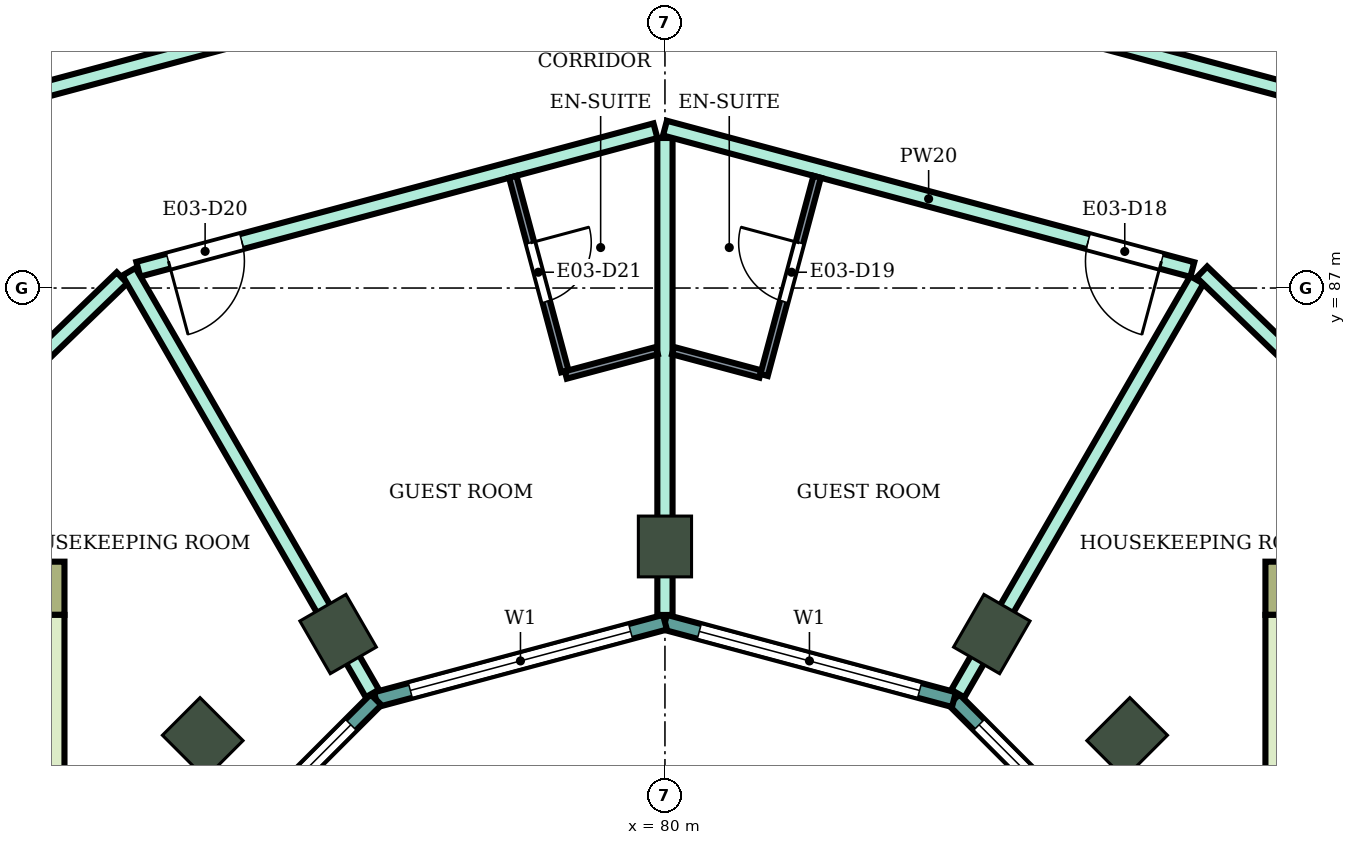
"""IFC4 building model, lengths in metres.
Left out: names, types, materials, properties, quantities, classifications, styles, units other than length and angle.
Written with IfcOpenShell. Run it as: python <this file> out.ifc"""

import sys

from ifc_helpers import new_model, si_unit, direction, frame, frame_2d, origin, origin_2d, place, context, subcontext, project, spatial, rectangle, extrude, element, fill, save


model = new_model("IFC4")
c1 = context("Model", 3, precision=1e-05, world=origin(), true_north=direction((0.0, 1.0)))
c2 = subcontext(c1, "Body", "Model", "MODEL_VIEW")
j1 = project(units=[si_unit("LENGTHUNIT", "METRE"), si_unit("PLANEANGLEUNIT", "RADIAN")], contexts=[c1])
p1 = place(None, origin())
s1 = spatial("IfcSite", under=j1, at=p1, CompositionType="ELEMENT")
p2 = place(p1, origin())
s2 = spatial("IfcBuilding", under=s1, at=p2, CompositionType="ELEMENT")
p3 = place(p2, frame((0.0, 0.0, 138.0)))
s3 = spatial("IfcBuildingStorey", under=s2, at=p3, CompositionType="ELEMENT", Elevation=138.0)
for number, where, z_axis, x_axis in (
    (1, (86.081, 81.081, 0.0), (0.0, 0.0, 1.0), (0.707, 0.707, 0.0)),
    (2, (84.3, 82.448, 0.0), (0.0, 0.0, 1.0), (0.5, 0.866, 0.0)),
    (3, (80.0, 83.6, 0.0), (0.0, 0.0, 1.0), (0.0, 1.0, 0.0)),
    (4, (75.7, 82.448, 0.0), (0.0, 0.0, 1.0), (-0.5, 0.866, 0.0)),
    (5, (73.919, 81.081, 0.0), (0.0, 0.0, 1.0), (-0.707, 0.707, 0.0)),
):
    element("IfcColumn", number, at=place(p3, frame(where, z_axis=z_axis, x_axis=x_axis)), inside=s3, PredefinedType="COLUMN", context=c2, shape_type="SweptSolid", body=[
        extrude(rectangle(XDim=0.8, YDim=0.7, at=origin_2d()), origin(), (0.0, 0.0, 1.0), 3.9),
    ])
p4 = place(p3, frame((87.9, 83.05, 0.0), z_axis=(0.0, 0.0, 1.0), x_axis=(1.0, 0.0, 0.0)))
e6 = element("IfcWall", 6, at=p4, inside=s3, PredefinedType="SHEAR", context=c2, shape_type="SweptSolid", body=[
    extrude(rectangle(XDim=14.8, YDim=0.7, at=frame_2d((7.4, 0.0))), origin(), (0.0, 0.0, 1.0), 3.58),
])
p5 = place(p4, frame((4.2, 0.0, 0.0)))
e7 = element("IfcOpeningElement", 7, at=p5, cuts=e6, PredefinedType="OPENING", context=c2, shape_type="SweptSolid", body=[
    extrude(rectangle(XDim=2.4, YDim=2.4, at=frame_2d((1.2, 1.2))), frame((0.0, 0.36, 0.0), z_axis=(0.0, -1.0, 0.0), x_axis=(1.0, 0.0, 0.0)), (0.0, 0.0, 1.0), 0.72),
])
p6 = place(p3, frame((88.125, 75.0, 0.0), z_axis=(0.0, 0.0, 1.0), x_axis=(0.0, 1.0, 0.0)))
e8 = element("IfcWall", 8, at=p6, inside=s3, PredefinedType="SHEAR", context=c2, shape_type="SweptSolid", body=[
    extrude(rectangle(XDim=7.7, YDim=0.45, at=frame_2d((3.85, 0.0))), origin(), (0.0, 0.0, 1.0), 3.58),
])
p7 = place(p3, frame((72.1, 83.05, 0.0), z_axis=(0.0, 0.0, 1.0), x_axis=(-1.0, 0.0, 0.0)))
e9 = element("IfcWall", 9, at=p7, inside=s3, PredefinedType="SHEAR", context=c2, shape_type="SweptSolid", body=[
    extrude(rectangle(XDim=14.8, YDim=0.7, at=frame_2d((7.4, 0.0))), origin(), (0.0, 0.0, 1.0), 3.58),
])
p8 = place(p7, frame((4.2, 0.0, 0.0)))
e10 = element("IfcOpeningElement", 10, at=p8, cuts=e9, PredefinedType="OPENING", context=c2, shape_type="SweptSolid", body=[
    extrude(rectangle(XDim=2.4, YDim=2.4, at=frame_2d((1.2, 1.2))), frame((0.0, 0.36, 0.0), z_axis=(0.0, -1.0, 0.0), x_axis=(1.0, 0.0, 0.0)), (0.0, 0.0, 1.0), 0.72),
])
p9 = place(p3, frame((71.875, 82.7, 0.0), z_axis=(0.0, 0.0, 1.0), x_axis=(0.0, -1.0, 0.0)))
e11 = element("IfcWall", 11, at=p9, inside=s3, PredefinedType="SHEAR", context=c2, shape_type="SweptSolid", body=[
    extrude(rectangle(XDim=7.7, YDim=0.45, at=frame_2d((3.85, 0.0))), origin(), (0.0, 0.0, 1.0), 3.58),
])
p10 = place(p3, frame((86.585, 78.802, 0.0), z_axis=(0.0, 0.0, 1.0), x_axis=(-0.707106781187, 0.707106781187, 0.0)))
e12 = element("IfcWall", 12, at=p10, inside=s3, PredefinedType="NOTDEFINED", context=c2, shape_type="SweptSolid", body=[
    extrude(rectangle(XDim=3.936, YDim=0.2, at=frame_2d((1.968, 0.0))), origin(), (0.0, 0.0, 1.0), 3.9),
])
p11 = place(p10, frame((0.468, 0.0, 0.9)))
e13 = element("IfcOpeningElement", 13, at=p11, cuts=e12, PredefinedType="OPENING", context=c2, shape_type="SweptSolid", body=[
    extrude(rectangle(XDim=3.0, YDim=2.3, at=frame_2d((1.5, 1.15))), frame((0.0, 0.11, 0.0), z_axis=(0.0, -1.0, 0.0), x_axis=(1.0, 0.0, 0.0)), (0.0, 0.0, 1.0), 0.22),
])
p12 = place(p3, frame((83.802, 81.585, 0.0), z_axis=(0.0, 0.0, 1.0), x_axis=(-0.965933654434, 0.258789828301, 0.0)))
e14 = element("IfcWall", 14, at=p12, inside=s3, PredefinedType="NOTDEFINED", context=c2, shape_type="SweptSolid", body=[
    extrude(rectangle(XDim=3.936, YDim=0.2, at=frame_2d((1.968, 0.0))), origin(), (0.0, 0.0, 1.0), 3.9),
])
p13 = place(p12, frame((0.468, 0.0, 0.9)))
e15 = element("IfcOpeningElement", 15, at=p13, cuts=e14, PredefinedType="OPENING", context=c2, shape_type="SweptSolid", body=[
    extrude(rectangle(XDim=3.0, YDim=2.3, at=frame_2d((1.5, 1.15))), frame((0.0, 0.11, 0.0), z_axis=(0.0, -1.0, 0.0), x_axis=(1.0, 0.0, 0.0)), (0.0, 0.0, 1.0), 0.22),
])
p14 = place(p3, frame((80.0, 82.604, 0.0), z_axis=(0.0, 0.0, 1.0), x_axis=(-0.965933654434, -0.258789828301, 0.0)))
e16 = element("IfcWall", 16, at=p14, inside=s3, PredefinedType="NOTDEFINED", context=c2, shape_type="SweptSolid", body=[
    extrude(rectangle(XDim=3.936, YDim=0.2, at=frame_2d((1.968, 0.0))), origin(), (0.0, 0.0, 1.0), 3.9),
])
p15 = place(p14, frame((0.468, 0.0, 0.9)))
e17 = element("IfcOpeningElement", 17, at=p15, cuts=e16, PredefinedType="OPENING", context=c2, shape_type="SweptSolid", body=[
    extrude(rectangle(XDim=3.0, YDim=2.3, at=frame_2d((1.5, 1.15))), frame((0.0, 0.11, 0.0), z_axis=(0.0, -1.0, 0.0), x_axis=(1.0, 0.0, 0.0)), (0.0, 0.0, 1.0), 0.22),
])
p16 = place(p3, frame((76.198, 81.585, 0.0), z_axis=(0.0, 0.0, 1.0), x_axis=(-0.707106781187, -0.707106781187, 0.0)))
e18 = element("IfcWall", 18, at=p16, inside=s3, PredefinedType="NOTDEFINED", context=c2, shape_type="SweptSolid", body=[
    extrude(rectangle(XDim=3.936, YDim=0.2, at=frame_2d((1.968, 0.0))), origin(), (0.0, 0.0, 1.0), 3.9),
])
p17 = place(p16, frame((0.468, 0.0, 0.9)))
e19 = element("IfcOpeningElement", 19, at=p17, cuts=e18, PredefinedType="OPENING", context=c2, shape_type="SweptSolid", body=[
    extrude(rectangle(XDim=3.0, YDim=2.3, at=frame_2d((1.5, 1.15))), frame((0.0, 0.11, 0.0), z_axis=(0.0, -1.0, 0.0), x_axis=(1.0, 0.0, 0.0)), (0.0, 0.0, 1.0), 0.22),
])
p18 = place(p3, frame((68.987, 83.4, 0.0), z_axis=(0.0, 0.0, 1.0), x_axis=(0.719547721855, 0.694442996922, 0.0)))
e20 = element("IfcWall", 20, at=p18, inside=s3, PredefinedType="PARTITIONING", context=c2, shape_type="SweptSolid", body=[
    extrude(rectangle(XDim=5.378, YDim=0.2, at=frame_2d((2.689, 0.0))), origin(), (0.0, 0.0, 1.0), 3.45),
])
p19 = place(p18, frame((2.294, 0.0, 0.0)))
e21 = element("IfcOpeningElement", 21, at=p19, cuts=e20, PredefinedType="OPENING", context=c2, shape_type="SweptSolid", body=[
    extrude(rectangle(XDim=0.9, YDim=2.1, at=frame_2d((0.45, 1.05))), frame((0.0, 0.11, 0.0), z_axis=(0.0, -1.0, 0.0), x_axis=(1.0, 0.0, 0.0)), (0.0, 0.0, 1.0), 0.22),
])
p20 = place(p3, frame((71.614, 89.55, 0.0), z_axis=(0.0, 0.0, 1.0), x_axis=(0.965982156828, 0.258608725086, 0.0)))
e22 = element("IfcWall", 22, at=p20, inside=s3, PredefinedType="PARTITIONING", context=c2, shape_type="SweptSolid", body=[
    extrude(rectangle(XDim=8.592, YDim=0.2, at=frame_2d((4.296, 0.0))), origin(), (0.0, 0.0, 1.0), 3.45),
])
p21 = place(p20, frame((4.865, 0.0, 0.0)))
e23 = element("IfcOpeningElement", 23, at=p21, cuts=e22, PredefinedType="OPENING", context=c2, shape_type="SweptSolid", body=[
    extrude(rectangle(XDim=1.0, YDim=2.1, at=frame_2d((0.5, 1.05))), frame((0.0, 0.11, 0.0), z_axis=(0.0, -1.0, 0.0), x_axis=(1.0, 0.0, 0.0)), (0.0, 0.0, 1.0), 0.22),
])
p22 = place(p20, frame((2.804, 0.0, 0.0)))
e24 = element("IfcOpeningElement", 24, at=p22, cuts=e22, PredefinedType="OPENING", context=c2, shape_type="SweptSolid", body=[
    extrude(rectangle(XDim=1.0, YDim=2.1, at=frame_2d((0.5, 1.05))), frame((0.0, 0.11, 0.0), z_axis=(0.0, -1.0, 0.0), x_axis=(1.0, 0.0, 0.0)), (0.0, 0.0, 1.0), 0.22),
])
p23 = place(p3, frame((73.071, 87.247, 0.0), z_axis=(0.0, 0.0, 1.0), x_axis=(0.965931651205, 0.258797305243, 0.0)))
e25 = element("IfcWall", 25, at=p23, inside=s3, PredefinedType="PARTITIONING", context=c2, shape_type="SweptSolid", body=[
    extrude(rectangle(XDim=7.043, YDim=0.2, at=frame_2d((3.521, 0.0))), origin(), (0.0, 0.0, 1.0), 3.45),
])
p24 = place(p23, frame((0.41, 0.0, 0.0)))
e26 = element("IfcOpeningElement", 26, at=p24, cuts=e25, PredefinedType="OPENING", context=c2, shape_type="SweptSolid", body=[
    extrude(rectangle(XDim=1.0, YDim=2.1, at=frame_2d((0.5, 1.05))), frame((0.0, 0.11, 0.0), z_axis=(0.0, -1.0, 0.0), x_axis=(1.0, 0.0, 0.0)), (0.0, 0.0, 1.0), 0.22),
])
p25 = place(p3, frame((72.948, 87.214, 0.0), z_axis=(0.0, 0.0, 1.0), x_axis=(0.499898430755, -0.866084036875, 0.0)))
e27 = element("IfcWall", 27, at=p25, inside=s3, PredefinedType="PARTITIONING", context=c2, shape_type="SweptSolid", body=[
    extrude(rectangle(XDim=6.405, YDim=0.2, at=frame_2d((3.203, 0.0))), origin(), (0.0, 0.0, 1.0), 3.45),
])
p26 = place(p3, frame((80.0, 82.699, 0.0), z_axis=(0.0, 0.0, 1.0), x_axis=(0.0, 1.0, 0.0)))
e28 = element("IfcWall", 28, at=p26, inside=s3, PredefinedType="PARTITIONING", context=c2, shape_type="SweptSolid", body=[
    extrude(rectangle(XDim=6.275, YDim=0.2, at=frame_2d((3.138, 0.0))), origin(), (0.0, 0.0, 1.0), 3.45),
])
p27 = place(p3, frame((80.0, 89.104, 0.0), z_axis=(0.0, 0.0, 1.0), x_axis=(0.965854247166, -0.25908603442, 0.0)))
e29 = element("IfcWall", 29, at=p27, inside=s3, PredefinedType="PARTITIONING", context=c2, shape_type="SweptSolid", body=[
    extrude(rectangle(XDim=7.183, YDim=0.2, at=frame_2d((3.592, 0.0))), origin(), (0.0, 0.0, 1.0), 3.45),
])
p28 = place(p27, frame((5.763, 0.0, 0.0)))
e30 = element("IfcOpeningElement", 30, at=p28, cuts=e29, PredefinedType="OPENING", context=c2, shape_type="SweptSolid", body=[
    extrude(rectangle(XDim=1.0, YDim=2.1, at=frame_2d((0.5, 1.05))), frame((0.0, 0.11, 0.0), z_axis=(0.0, -1.0, 0.0), x_axis=(1.0, 0.0, 0.0)), (0.0, 0.0, 1.0), 0.22),
])
p29 = place(p3, frame((80.0, 91.796, 0.0), z_axis=(0.0, 0.0, 1.0), x_axis=(0.965891796243, -0.258946013582, 0.0)))
e31 = element("IfcWall", 31, at=p29, inside=s3, PredefinedType="PARTITIONING", context=c2, shape_type="SweptSolid", body=[
    extrude(rectangle(XDim=8.642, YDim=0.2, at=frame_2d((4.321, 0.0))), origin(), (0.0, 0.0, 1.0), 3.45),
])
p30 = place(p29, frame((4.877, 0.0, 0.0)))
e32 = element("IfcOpeningElement", 32, at=p30, cuts=e31, PredefinedType="OPENING", context=c2, shape_type="SweptSolid", body=[
    extrude(rectangle(XDim=1.0, YDim=2.1, at=frame_2d((0.5, 1.05))), frame((0.0, 0.11, 0.0), z_axis=(0.0, -1.0, 0.0), x_axis=(1.0, 0.0, 0.0)), (0.0, 0.0, 1.0), 0.22),
])
p31 = place(p29, frame((2.817, 0.0, 0.0)))
e33 = element("IfcOpeningElement", 33, at=p31, cuts=e31, PredefinedType="OPENING", context=c2, shape_type="SweptSolid", body=[
    extrude(rectangle(XDim=1.0, YDim=2.1, at=frame_2d((0.5, 1.05))), frame((0.0, 0.11, 0.0), z_axis=(0.0, -1.0, 0.0), x_axis=(1.0, 0.0, 0.0)), (0.0, 0.0, 1.0), 0.22),
])
p32 = place(p3, frame((83.854, 81.665, 0.0), z_axis=(0.0, 0.0, 1.0), x_axis=(0.500241355856, 0.865886012066, 0.0)))
e34 = element("IfcWall", 34, at=p32, inside=s3, PredefinedType="PARTITIONING", context=c2, shape_type="SweptSolid", body=[
    extrude(rectangle(XDim=6.285, YDim=0.2, at=frame_2d((3.143, 0.0))), origin(), (0.0, 0.0, 1.0), 3.45),
])
p33 = place(p3, frame((87.064, 87.211, 0.0), z_axis=(0.0, 0.0, 1.0), x_axis=(0.719562412484, -0.694427774891, 0.0)))
e35 = element("IfcWall", 35, at=p33, inside=s3, PredefinedType="PARTITIONING", context=c2, shape_type="SweptSolid", body=[
    extrude(rectangle(XDim=5.488, YDim=0.2, at=frame_2d((2.744, 0.0))), origin(), (0.0, 0.0, 1.0), 3.45),
])
p34 = place(p33, frame((2.294, 0.0, 0.0)))
e36 = element("IfcOpeningElement", 36, at=p34, cuts=e35, PredefinedType="OPENING", context=c2, shape_type="SweptSolid", body=[
    extrude(rectangle(XDim=0.9, YDim=2.1, at=frame_2d((0.45, 1.05))), frame((0.0, 0.11, 0.0), z_axis=(0.0, -1.0, 0.0), x_axis=(1.0, 0.0, 0.0)), (0.0, 0.0, 1.0), 0.22),
])
p35 = place(p3, frame((77.998, 88.463, 0.0), z_axis=(0.0, 0.0, 1.0), x_axis=(0.258677737588, -0.965963678446, 0.0)))
e37 = element("IfcWall", 37, at=p35, inside=s3, PredefinedType="PARTITIONING", context=c2, shape_type="SweptSolid", body=[
    extrude(rectangle(XDim=2.649, YDim=0.1, at=frame_2d((1.325, 0.0))), origin(), (0.0, 0.0, 1.0), 3.45),
])
p36 = place(p35, frame((0.9, 0.0, 0.0)))
e38 = element("IfcOpeningElement", 38, at=p36, cuts=e37, PredefinedType="OPENING", context=c2, shape_type="SweptSolid", body=[
    extrude(rectangle(XDim=0.8, YDim=2.1, at=frame_2d((0.4, 1.05))), frame((0.0, 0.06, 0.0), z_axis=(0.0, -1.0, 0.0), x_axis=(1.0, 0.0, 0.0)), (0.0, 0.0, 1.0), 0.12),
])
p37 = place(p3, frame((78.696, 85.856, 0.0), z_axis=(0.0, 0.0, 1.0), x_axis=(0.966002513606, 0.258532674351, 0.0)))
e39 = element("IfcWall", 39, at=p37, inside=s3, PredefinedType="PARTITIONING", context=c2, shape_type="SweptSolid", body=[
    extrude(rectangle(XDim=1.24, YDim=0.1, at=frame_2d((0.62, 0.0))), origin(), (0.0, 0.0, 1.0), 3.45),
])
p38 = place(p3, frame((80.106, 86.177, 0.0), z_axis=(0.0, 0.0, 1.0), x_axis=(0.966002973184, -0.258530957139, 0.0)))
e40 = element("IfcWall", 40, at=p38, inside=s3, PredefinedType="PARTITIONING", context=c2, shape_type="SweptSolid", body=[
    extrude(rectangle(XDim=1.19, YDim=0.1, at=frame_2d((0.595, 0.0))), origin(), (0.0, 0.0, 1.0), 3.45),
])
p39 = place(p3, frame((81.304, 85.856, 0.0), z_axis=(0.0, 0.0, 1.0), x_axis=(0.25867580527, 0.965964195904, 0.0)))
e41 = element("IfcWall", 41, at=p39, inside=s3, PredefinedType="PARTITIONING", context=c2, shape_type="SweptSolid", body=[
    extrude(rectangle(XDim=2.699, YDim=0.1, at=frame_2d((1.35, 0.0))), origin(), (0.0, 0.0, 1.0), 3.45),
])
p40 = place(p39, frame((1.0, 0.0, 0.0)))
e42 = element("IfcOpeningElement", 42, at=p40, cuts=e41, PredefinedType="OPENING", context=c2, shape_type="SweptSolid", body=[
    extrude(rectangle(XDim=0.8, YDim=2.1, at=frame_2d((0.4, 1.05))), frame((0.0, 0.06, 0.0), z_axis=(0.0, -1.0, 0.0), x_axis=(1.0, 0.0, 0.0)), (0.0, 0.0, 1.0), 0.12),
])
p41 = place(p11, origin())
e43 = element("IfcWindow", 43, at=p41, inside=s3, PartitioningType="SINGLE_PANEL", PredefinedType="WINDOW", context=c2, shape_type="SweptSolid", body=[
    extrude(rectangle(XDim=3.0, YDim=2.3, at=frame_2d((1.5, 1.15))), frame((0.0, 0.03, 0.0), z_axis=(0.0, -1.0, 0.0), x_axis=(1.0, 0.0, 0.0)), (0.0, 0.0, 1.0), 0.06),
])
fill(e13, e43)
p42 = place(p13, origin())
e44 = element("IfcWindow", 44, at=p42, inside=s3, PartitioningType="SINGLE_PANEL", PredefinedType="WINDOW", context=c2, shape_type="SweptSolid", body=[
    extrude(rectangle(XDim=3.0, YDim=2.3, at=frame_2d((1.5, 1.15))), frame((0.0, 0.03, 0.0), z_axis=(0.0, -1.0, 0.0), x_axis=(1.0, 0.0, 0.0)), (0.0, 0.0, 1.0), 0.06),
])
fill(e15, e44)
p43 = place(p15, origin())
e45 = element("IfcWindow", 45, at=p43, inside=s3, PartitioningType="SINGLE_PANEL", PredefinedType="WINDOW", context=c2, shape_type="SweptSolid", body=[
    extrude(rectangle(XDim=3.0, YDim=2.3, at=frame_2d((1.5, 1.15))), frame((0.0, 0.03, 0.0), z_axis=(0.0, -1.0, 0.0), x_axis=(1.0, 0.0, 0.0)), (0.0, 0.0, 1.0), 0.06),
])
fill(e17, e45)
p44 = place(p17, origin())
e46 = element("IfcWindow", 46, at=p44, inside=s3, PartitioningType="SINGLE_PANEL", PredefinedType="WINDOW", context=c2, shape_type="SweptSolid", body=[
    extrude(rectangle(XDim=3.0, YDim=2.3, at=frame_2d((1.5, 1.15))), frame((0.0, 0.03, 0.0), z_axis=(0.0, -1.0, 0.0), x_axis=(1.0, 0.0, 0.0)), (0.0, 0.0, 1.0), 0.06),
])
fill(e19, e46)
p45 = place(p28, frame((1.0, 0.0, 0.0), z_axis=(0.0, 0.0, 1.0), x_axis=(-1.0, 0.0, 0.0)))
e47 = element("IfcDoor", 47, at=p45, inside=s3, OperationType="SINGLE_SWING_LEFT", PredefinedType="DOOR", context=c2, shape_type="SweptSolid", body=[
    extrude(rectangle(XDim=1.0, YDim=2.1, at=frame_2d((0.5, 1.05))), frame((0.0, 0.025, 0.0), z_axis=(0.0, -1.0, 0.0), x_axis=(1.0, 0.0, 0.0)), (0.0, 0.0, 1.0), 0.05),
])
fill(e30, e47)
p46 = place(p40, origin())
e48 = element("IfcDoor", 48, at=p46, inside=s3, OperationType="SINGLE_SWING_RIGHT", PredefinedType="DOOR", context=c2, shape_type="SweptSolid", body=[
    extrude(rectangle(XDim=0.8, YDim=2.1, at=frame_2d((0.4, 1.05))), frame((0.0, 0.025, 0.0), z_axis=(0.0, -1.0, 0.0), x_axis=(1.0, 0.0, 0.0)), (0.0, 0.0, 1.0), 0.05),
])
fill(e42, e48)
p47 = place(p24, frame((1.0, 0.0, 0.0), z_axis=(0.0, 0.0, 1.0), x_axis=(-1.0, 0.0, 0.0)))
e49 = element("IfcDoor", 49, at=p47, inside=s3, OperationType="SINGLE_SWING_RIGHT", PredefinedType="DOOR", context=c2, shape_type="SweptSolid", body=[
    extrude(rectangle(XDim=1.0, YDim=2.1, at=frame_2d((0.5, 1.05))), frame((0.0, 0.025, 0.0), z_axis=(0.0, -1.0, 0.0), x_axis=(1.0, 0.0, 0.0)), (0.0, 0.0, 1.0), 0.05),
])
fill(e26, e49)
p48 = place(p36, origin())
e50 = element("IfcDoor", 50, at=p48, inside=s3, OperationType="SINGLE_SWING_LEFT", PredefinedType="DOOR", context=c2, shape_type="SweptSolid", body=[
    extrude(rectangle(XDim=0.8, YDim=2.1, at=frame_2d((0.4, 1.05))), frame((0.0, 0.025, 0.0), z_axis=(0.0, -1.0, 0.0), x_axis=(1.0, 0.0, 0.0)), (0.0, 0.0, 1.0), 0.05),
])
fill(e38, e50)
save(model, sys.argv[1])
